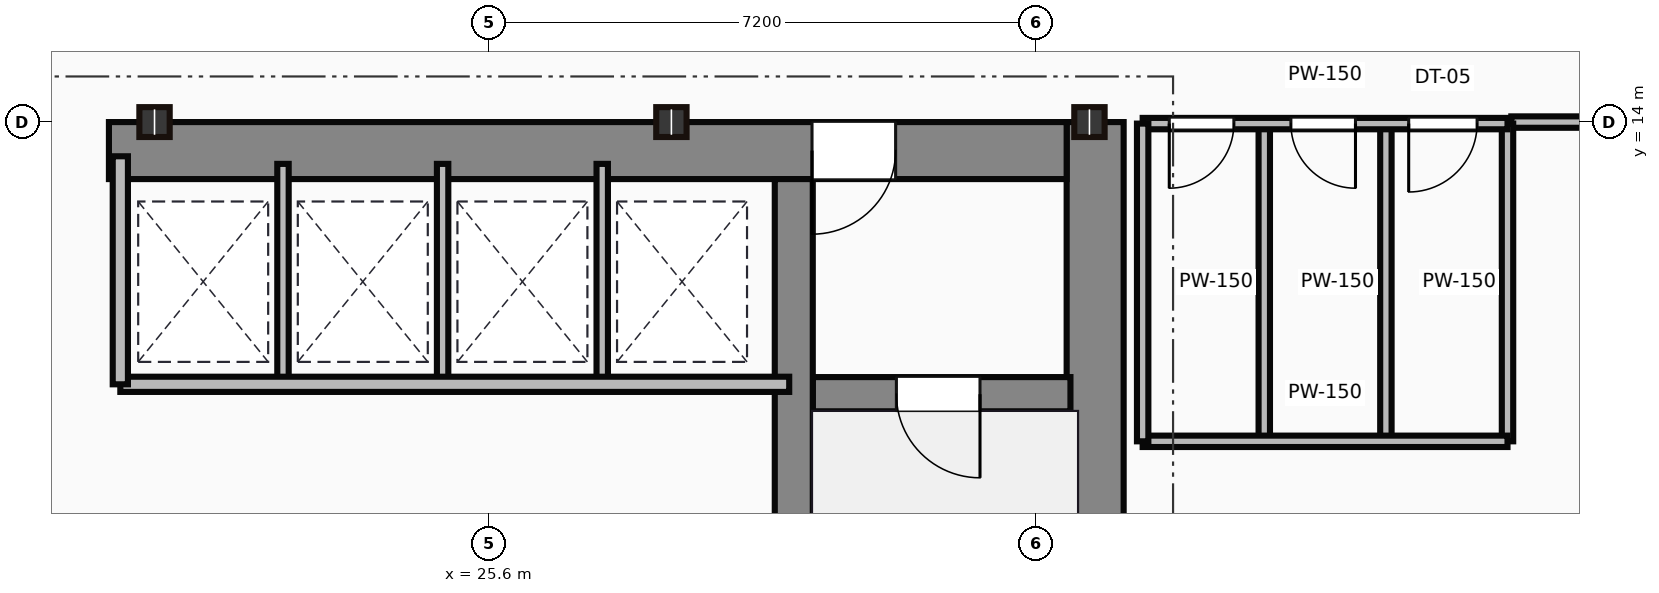
"""IFC4 building model, lengths in metres.
Left out: names, types, materials, properties, quantities, classifications, styles, units other than length and angle.
Written with IfcOpenShell. Run it as: python <this file> out.ifc"""

import sys

from ifc_helpers import new_model, si_unit, direction, frame, frame_2d, origin, origin_2d, place, context, subcontext, project, spatial, rectangle, i_section, extrude, source, transform, mapped, element, fill, save


model = new_model("IFC4")
c1 = context("Model", 3, precision=1e-05, world=origin(), true_north=direction((0.0, 1.0)))
c2 = subcontext(c1, "Body", "Model", "MODEL_VIEW")
j1 = project(units=[si_unit("LENGTHUNIT", "METRE"), si_unit("PLANEANGLEUNIT", "RADIAN")], contexts=[c1])
p1 = place(None, origin())
s1 = spatial("IfcSite", under=j1, at=p1, CompositionType="ELEMENT")
p2 = place(p1, origin())
s2 = spatial("IfcBuilding", under=s1, at=p2, CompositionType="ELEMENT")
p3 = place(p2, frame((0.0, 0.0, 117.85)))
s3 = spatial("IfcBuildingStorey", under=s2, at=p3, CompositionType="ELEMENT", Elevation=117.85)
m1 = source(origin(), c2, "Body", "SweptSolid", [
    extrude(rectangle(XDim=13.1, YDim=0.75, at=frame_2d((6.55, 0.0))), origin(), (0.0, 0.0, 1.0), 3.65),
])
p4 = place(p3, frame((33.575, 0.9, 0.0), z_axis=(0.0, 0.0, 1.0), x_axis=(0.0, 1.0, 0.0)))
e1 = element("IfcWall", 1, at=p4, inside=s3, PredefinedType="SHEAR", context=c2, shape_type="MappedRepresentation", body=[
    mapped(m1, transform((0.0, 0.0, 0.0))),
])
m2 = source(origin(), c2, "Body", "SweptSolid", [
    extrude(rectangle(XDim=12.6, YDim=0.75, at=frame_2d((6.3, 0.0))), origin(), (0.0, 0.0, 1.0), 3.65),
])
p5 = place(p3, frame((20.6, 13.625, 0.0), z_axis=(0.0, 0.0, 1.0), x_axis=(1.0, 0.0, 0.0)))
e2 = element("IfcWall", 2, at=p5, inside=s3, PredefinedType="SHEAR", context=c2, shape_type="MappedRepresentation", body=[
    mapped(m2, transform((0.0, 0.0, 0.0))),
])
p6 = place(p5, frame((9.25, 0.0, 0.0)))
e3 = element("IfcOpeningElement", 3, at=p6, cuts=e2, PredefinedType="OPENING", context=c2, shape_type="SweptSolid", body=[
    extrude(rectangle(XDim=1.1, YDim=2.15, at=frame_2d((0.55, 1.075))), frame((0.0, 0.385, 0.0), z_axis=(0.0, -1.0, 0.0), x_axis=(1.0, 0.0, 0.0)), (0.0, 0.0, 1.0), 0.77),
])
m3 = source(origin(), c2, "Body", "SweptSolid", [
    extrude(rectangle(XDim=12.35, YDim=0.5, at=frame_2d((6.175, 0.0))), origin(), (0.0, 0.0, 1.0), 3.65),
])
p7 = place(p3, frame((29.61, 0.9, 0.0), z_axis=(0.0, 0.0, 1.0), x_axis=(0.0, 1.0, 0.0)))
e4 = element("IfcWall", 4, at=p7, inside=s3, PredefinedType="SHEAR", context=c2, shape_type="MappedRepresentation", body=[
    mapped(m3, transform((0.0, 0.0, 0.0))),
])
m4 = source(origin(), c2, "Body", "SweptSolid", [
    extrude(rectangle(XDim=3.39, YDim=0.45, at=frame_2d((1.695, 0.0))), origin(), (0.0, 0.0, 1.0), 3.65),
])
p8 = place(p3, frame((29.86, 10.42, 0.0), z_axis=(0.0, 0.0, 1.0), x_axis=(1.0, 0.0, 0.0)))
e5 = element("IfcWall", 5, at=p8, inside=s3, PredefinedType="SHEAR", context=c2, shape_type="MappedRepresentation", body=[
    mapped(m4, transform((0.0, 0.0, 0.0))),
])
p9 = place(p8, frame((1.1, 0.0, 0.0)))
e6 = element("IfcOpeningElement", 6, at=p9, cuts=e5, PredefinedType="OPENING", context=c2, shape_type="SweptSolid", body=[
    extrude(rectangle(XDim=1.1, YDim=2.15, at=frame_2d((0.55, 1.075))), frame((0.0, 0.235, 0.0), z_axis=(0.0, -1.0, 0.0), x_axis=(1.0, 0.0, 0.0)), (0.0, 0.0, 1.0), 0.47),
])
m5 = source(origin(), c2, "Body", "SweptSolid", [
    extrude(i_section(OverallWidth=0.399, OverallDepth=0.393, WebThickness=0.023, FlangeThickness=0.037, at=origin_2d()), origin(), (0.0, 0.0, 1.0), 3.65),
])
for number, where, z_axis, x_axis in (
    (7, (21.2, 14.0, 0.0), (0.0, 0.0, 1.0), (1.0, 0.0, 0.0)),
    (8, (28.0, 14.0, 0.0), (0.0, 0.0, 1.0), (1.0, 0.0, 0.0)),
    (9, (33.5, 14.0, 0.0), (0.0, 0.0, 1.0), (1.0, 0.0, 0.0)),
):
    element("IfcColumn", number, at=place(p3, frame(where, z_axis=z_axis, x_axis=x_axis)), inside=s3, PredefinedType="COLUMN", context=c2, shape_type="MappedRepresentation", body=[
        mapped(m5, transform((0.0, 0.0, 0.0))),
    ])
m6 = source(origin(), c2, "Body", "SweptSolid", [
    extrude(rectangle(XDim=8.8, YDim=0.2, at=frame_2d((4.4, 0.0))), origin(), (0.0, 0.0, 1.0), 3.4),
])
p10 = place(p3, frame((20.75, 10.55, 0.0), z_axis=(0.0, 0.0, 1.0), x_axis=(1.0, 0.0, 0.0)))
e10 = element("IfcWall", 10, at=p10, inside=s3, PredefinedType="PARTITIONING", context=c2, shape_type="MappedRepresentation", body=[
    mapped(m6, transform((0.0, 0.0, 0.0))),
])
m7 = source(origin(), c2, "Body", "SweptSolid", [
    extrude(rectangle(XDim=3.0, YDim=0.2, at=frame_2d((1.5, 0.0))), origin(), (0.0, 0.0, 1.0), 3.4),
])
p11 = place(p3, frame((20.75, 10.55, 0.0), z_axis=(0.0, 0.0, 1.0), x_axis=(0.0, 1.0, 0.0)))
e11 = element("IfcWall", 11, at=p11, inside=s3, PredefinedType="PARTITIONING", context=c2, shape_type="MappedRepresentation", body=[
    mapped(m7, transform((0.0, 0.0, 0.0))),
])
m8 = source(origin(), c2, "Body", "SweptSolid", [
    extrude(rectangle(XDim=2.85, YDim=0.15, at=frame_2d((1.425, 0.0))), origin(), (0.0, 0.0, 1.0), 3.4),
])
for number, where, z_axis, x_axis in (
    (12, (22.89, 10.6, 0.0), (0.0, 0.0, 1.0), (0.0, 1.0, 0.0)),
    (13, (24.99, 10.6, 0.0), (0.0, 0.0, 1.0), (0.0, 1.0, 0.0)),
    (14, (27.09, 10.6, 0.0), (0.0, 0.0, 1.0), (0.0, 1.0, 0.0)),
):
    element("IfcWall", number, at=place(p3, frame(where, z_axis=z_axis, x_axis=x_axis)), inside=s3, PredefinedType="PARTITIONING", context=c2, shape_type="MappedRepresentation", body=[
        mapped(m8, transform((0.0, 0.0, 0.0))),
    ])
m9 = source(origin(), c2, "Body", "SweptSolid", [
    extrude(rectangle(XDim=4.8, YDim=0.15, at=frame_2d((2.4, 0.0))), origin(), (0.0, 0.0, 1.0), 2.702),
])
p12 = place(p3, frame((34.2, 13.98, 0.0), z_axis=(0.0, 0.0, 1.0), x_axis=(1.0, 0.0, 0.0)))
e15 = element("IfcWall", 15, at=p12, inside=s3, PredefinedType="PARTITIONING", context=c2, shape_type="MappedRepresentation", body=[
    mapped(m9, transform((0.0, 0.0, 0.0))),
])
p13 = place(p12, frame((0.35, 0.0, 0.0)))
e16 = element("IfcOpeningElement", 16, at=p13, cuts=e15, PredefinedType="OPENING", context=c2, shape_type="SweptSolid", body=[
    extrude(rectangle(XDim=0.85, YDim=2.1, at=frame_2d((0.425, 1.05))), frame((0.0, 0.085, 0.0), z_axis=(0.0, -1.0, 0.0), x_axis=(1.0, 0.0, 0.0)), (0.0, 0.0, 1.0), 0.17),
])
p14 = place(p12, frame((1.95, 0.0, 0.0)))
e17 = element("IfcOpeningElement", 17, at=p14, cuts=e15, PredefinedType="OPENING", context=c2, shape_type="SweptSolid", body=[
    extrude(rectangle(XDim=0.85, YDim=2.1, at=frame_2d((0.425, 1.05))), frame((0.0, 0.085, 0.0), z_axis=(0.0, -1.0, 0.0), x_axis=(1.0, 0.0, 0.0)), (0.0, 0.0, 1.0), 0.17),
])
p15 = place(p12, frame((3.5, 0.0, 0.0)))
e18 = element("IfcOpeningElement", 18, at=p15, cuts=e15, PredefinedType="OPENING", context=c2, shape_type="SweptSolid", body=[
    extrude(rectangle(XDim=0.9, YDim=2.1, at=frame_2d((0.45, 1.05))), frame((0.0, 0.085, 0.0), z_axis=(0.0, -1.0, 0.0), x_axis=(1.0, 0.0, 0.0)), (0.0, 0.0, 1.0), 0.17),
])
m10 = source(origin(), c2, "Body", "SweptSolid", [
    extrude(rectangle(XDim=4.8, YDim=0.15, at=frame_2d((2.4, 0.0))), origin(), (0.0, 0.0, 1.0), 3.4),
])
p16 = place(p3, frame((34.2, 9.8, 0.0), z_axis=(0.0, 0.0, 1.0), x_axis=(1.0, 0.0, 0.0)))
e19 = element("IfcWall", 19, at=p16, inside=s3, PredefinedType="PARTITIONING", context=c2, shape_type="MappedRepresentation", body=[
    mapped(m10, transform((0.0, 0.0, 0.0))),
])
m11 = source(origin(), c2, "Body", "SweptSolid", [
    extrude(rectangle(XDim=4.18, YDim=0.15, at=frame_2d((2.09, 0.0))), origin(), (0.0, 0.0, 1.0), 3.4),
])
for number, where, z_axis, x_axis in (
    (20, (39.0, 9.8, 0.0), (0.0, 0.0, 1.0), (0.0, 1.0, 0.0)),
    (21, (34.2, 9.8, 0.0), (0.0, 0.0, 1.0), (0.0, 1.0, 0.0)),
    (22, (35.8, 9.8, 0.0), (0.0, 0.0, 1.0), (0.0, 1.0, 0.0)),
    (23, (37.4, 9.8, 0.0), (0.0, 0.0, 1.0), (0.0, 1.0, 0.0)),
):
    element("IfcWall", number, at=place(p3, frame(where, z_axis=z_axis, x_axis=x_axis)), inside=s3, PredefinedType="PARTITIONING", context=c2, shape_type="MappedRepresentation", body=[
        mapped(m11, transform((0.0, 0.0, 0.0))),
    ])
m12 = source(origin(), c2, "Body", "SweptSolid", [
    extrude(rectangle(XDim=1.75, YDim=0.15, at=frame_2d((0.875, 0.0))), origin(), (0.0, 0.0, 1.0), 2.702),
])
p17 = place(p3, frame((40.8, 14.0, 0.0), z_axis=(0.0, 0.0, 1.0), x_axis=(-1.0, 0.0, 0.0)))
e24 = element("IfcWall", 24, at=p17, inside=s3, PredefinedType="PARTITIONING", context=c2, shape_type="MappedRepresentation", body=[
    mapped(m12, transform((0.0, 0.0, 0.0))),
])
m13 = source(origin(), c2, "Body", "SweptSolid", [
    extrude(rectangle(XDim=1.1, YDim=2.15, at=frame_2d((0.55, 1.075))), frame((0.0, 0.025, 0.0), z_axis=(0.0, -1.0, 0.0), x_axis=(1.0, 0.0, 0.0)), (0.0, 0.0, 1.0), 0.05),
])
p18 = place(p9, frame((1.1, 0.0, 0.0), z_axis=(0.0, 0.0, 1.0), x_axis=(-1.0, 0.0, 0.0)))
e25 = element("IfcDoor", 25, at=p18, inside=s3, OperationType="SINGLE_SWING_RIGHT", PredefinedType="DOOR", context=c2, shape_type="MappedRepresentation", body=[
    mapped(m13, transform((0.0, 0.0, 0.0))),
])
fill(e6, e25)
p19 = place(p6, origin())
e26 = element("IfcDoor", 26, at=p19, inside=s3, OperationType="SINGLE_SWING_LEFT", PredefinedType="DOOR", context=c2, shape_type="MappedRepresentation", body=[
    mapped(m13, transform((0.0, 0.0, 0.0))),
])
fill(e3, e26)
m14 = source(origin(), c2, "Body", "SweptSolid", [
    extrude(rectangle(XDim=0.85, YDim=2.1, at=frame_2d((0.425, 1.05))), frame((0.0, 0.025, 0.0), z_axis=(0.0, -1.0, 0.0), x_axis=(1.0, 0.0, 0.0)), (0.0, 0.0, 1.0), 0.05),
])
p20 = place(p13, frame((0.85, 0.0, 0.0), z_axis=(0.0, 0.0, 1.0), x_axis=(-1.0, 0.0, 0.0)))
e27 = element("IfcDoor", 27, at=p20, inside=s3, OperationType="SINGLE_SWING_LEFT", PredefinedType="DOOR", context=c2, shape_type="MappedRepresentation", body=[
    mapped(m14, transform((0.0, 0.0, 0.0))),
])
fill(e16, e27)
p21 = place(p14, frame((0.85, 0.0, 0.0), z_axis=(0.0, 0.0, 1.0), x_axis=(-1.0, 0.0, 0.0)))
e28 = element("IfcDoor", 28, at=p21, inside=s3, OperationType="SINGLE_SWING_RIGHT", PredefinedType="DOOR", context=c2, shape_type="MappedRepresentation", body=[
    mapped(m14, transform((0.0, 0.0, 0.0))),
])
fill(e17, e28)
m15 = source(origin(), c2, "Body", "SweptSolid", [
    extrude(rectangle(XDim=0.9, YDim=2.1, at=frame_2d((0.45, 1.05))), frame((0.0, 0.025, 0.0), z_axis=(0.0, -1.0, 0.0), x_axis=(1.0, 0.0, 0.0)), (0.0, 0.0, 1.0), 0.05),
])
p22 = place(p15, frame((0.9, 0.0, 0.0), z_axis=(0.0, 0.0, 1.0), x_axis=(-1.0, 0.0, 0.0)))
e29 = element("IfcDoor", 29, at=p22, inside=s3, OperationType="SINGLE_SWING_LEFT", PredefinedType="DOOR", context=c2, shape_type="MappedRepresentation", body=[
    mapped(m15, transform((0.0, 0.0, 0.0))),
])
fill(e18, e29)
save(model, sys.argv[1])
